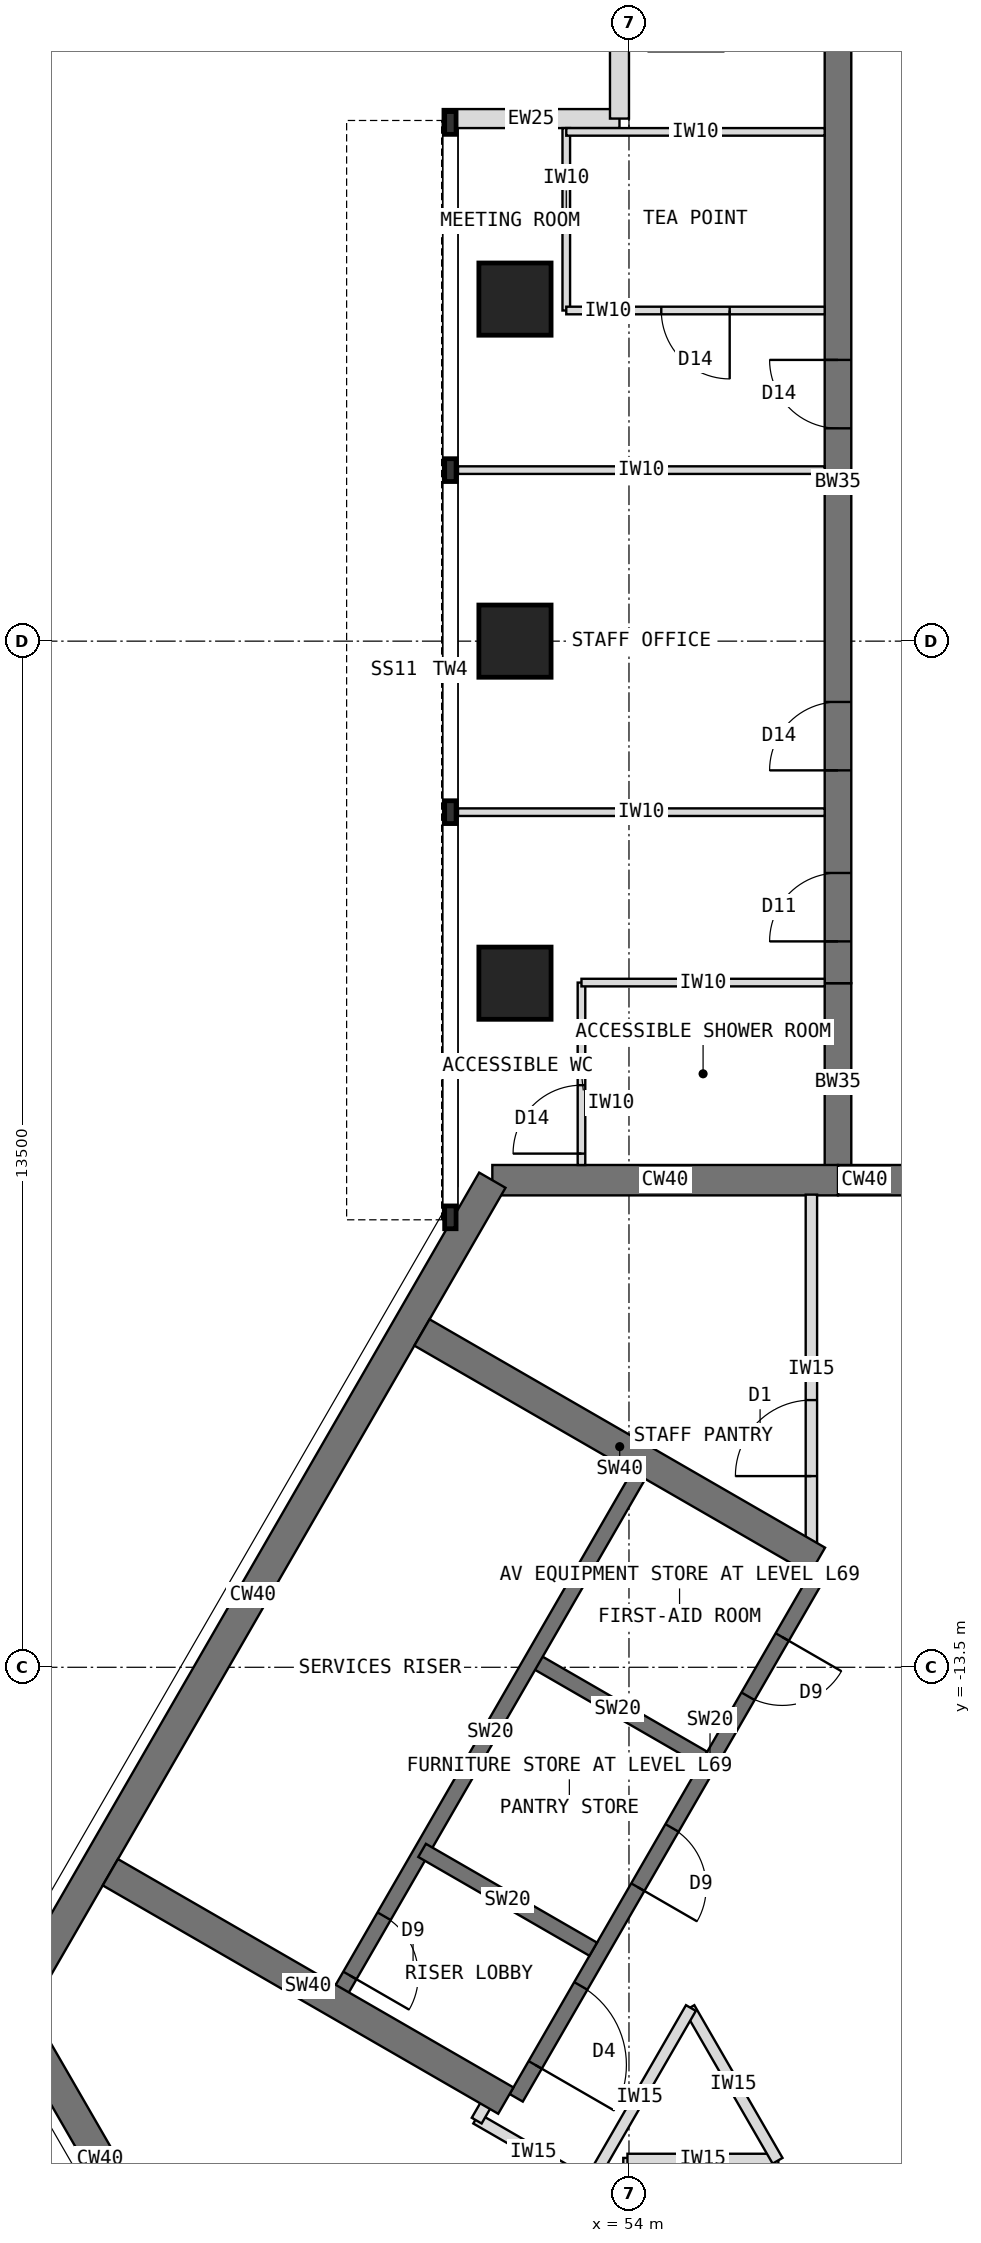
"""IFC4 building model, lengths in metres.
Left out: names, types, materials, properties, quantities, classifications, styles, units other than length and angle.
Written with IfcOpenShell. Run it as: python <this file> out.ifc"""

import sys

from ifc_helpers import new_model, si_unit, direction, frame, frame_2d, origin, origin_2d, place, context, subcontext, project, spatial, rectangle, extrude, element, fill, save


model = new_model("IFC4")
c1 = context("Model", 3, precision=1e-05, world=origin(), true_north=direction((0.0, 1.0)))
c2 = subcontext(c1, "Body", "Model", "MODEL_VIEW")
j1 = project(units=[si_unit("LENGTHUNIT", "METRE"), si_unit("PLANEANGLEUNIT", "RADIAN")], contexts=[c1])
p1 = place(None, origin())
s1 = spatial("IfcSite", under=j1, at=p1, CompositionType="ELEMENT")
p2 = place(p1, origin())
s2 = spatial("IfcBuilding", under=s1, at=p2, CompositionType="ELEMENT")
p3 = place(p2, frame((0.0, 0.0, 279.5)))
s3 = spatial("IfcBuildingStorey", under=s2, at=p3, CompositionType="ELEMENT", Elevation=279.5)
p4 = place(p3, frame((60.25, -7.092, 0.0), z_axis=(0.0, 0.0, 1.0), x_axis=(-1.0, 0.0, 0.0)))
e1 = element("IfcWall", 1, at=p4, inside=s3, PredefinedType="SHEAR", context=c2, shape_type="SweptSolid", body=[
    extrude(rectangle(XDim=3.5, YDim=0.4, at=frame_2d((1.75, 0.0))), origin(), (0.0, 0.0, 1.0), 4.0),
])
p5 = place(p4, frame((0.85, 0.0, 0.0)))
e2 = element("IfcOpeningElement", 2, at=p5, cuts=e1, PredefinedType="OPENING", context=c2, shape_type="SweptSolid", body=[
    extrude(rectangle(XDim=1.8, YDim=2.1, at=frame_2d((0.9, 1.05))), frame((0.0, 0.21, 0.0), z_axis=(0.0, -1.0, 0.0), x_axis=(1.0, 0.0, 0.0)), (0.0, 0.0, 1.0), 0.42),
])
p6 = place(p3, frame((56.75, -7.092, 0.0), z_axis=(0.0, 0.0, 1.0), x_axis=(-1.0, 0.0, 0.0)))
e3 = element("IfcWall", 3, at=p6, inside=s3, PredefinedType="SHEAR", context=c2, shape_type="SweptSolid", body=[
    extrude(rectangle(XDim=4.548, YDim=0.4, at=frame_2d((2.274, 0.0))), origin(), (0.0, 0.0, 1.0), 4.0),
])
p7 = place(p3, frame((52.202, -7.092, 0.0), z_axis=(0.0, 0.0, 1.0), x_axis=(-0.500005998175, -0.866021940709, 0.0)))
e4 = element("IfcWall", 4, at=p7, inside=s3, PredefinedType="SHEAR", context=c2, shape_type="SweptSolid", body=[
    extrude(rectangle(XDim=12.596, YDim=0.4, at=frame_2d((6.298, 0.0))), origin(), (0.0, 0.0, 1.0), 4.0),
])
p8 = place(p3, frame((45.904, -18.0, 0.0), z_axis=(0.0, 0.0, 1.0), x_axis=(0.500024481964, -0.866011268655, 0.0)))
e5 = element("IfcWall", 5, at=p8, inside=s3, PredefinedType="SHEAR", context=c2, shape_type="SweptSolid", body=[
    extrude(rectangle(XDim=4.548, YDim=0.4, at=frame_2d((2.274, 0.0))), origin(), (0.0, 0.0, 1.0), 4.0),
])
p9 = place(p3, frame((56.75, -7.092, 0.0), z_axis=(0.0, 0.0, 1.0), x_axis=(0.0, 1.0, 0.0)))
e6 = element("IfcWall", 6, at=p9, inside=s3, PredefinedType="SHEAR", context=c2, shape_type="SweptSolid", body=[
    extrude(rectangle(XDim=2.592, YDim=0.35, at=frame_2d((1.296, 0.0))), origin(), (0.0, 0.0, 1.0), 4.0),
])
p10 = place(p3, frame((56.75, -4.5, 0.0), z_axis=(0.0, 0.0, 1.0), x_axis=(0.0, 1.0, 0.0)))
e7 = element("IfcWall", 7, at=p10, inside=s3, PredefinedType="SHEAR", context=c2, shape_type="SweptSolid", body=[
    extrude(rectangle(XDim=13.2, YDim=0.35, at=frame_2d((6.6, 0.0))), origin(), (0.0, 0.0, 1.0), 4.0),
])
p11 = place(p10, frame((0.55, 0.0, 0.0)))
e8 = element("IfcOpeningElement", 8, at=p11, cuts=e7, PredefinedType="OPENING", context=c2, shape_type="SweptSolid", body=[
    extrude(rectangle(XDim=0.9, YDim=2.1, at=frame_2d((0.45, 1.05))), frame((0.0, 0.185, 0.0), z_axis=(0.0, -1.0, 0.0), x_axis=(1.0, 0.0, 0.0)), (0.0, 0.0, 1.0), 0.37),
])
p12 = place(p10, frame((2.8, 0.0, 0.0)))
e9 = element("IfcOpeningElement", 9, at=p12, cuts=e7, PredefinedType="OPENING", context=c2, shape_type="SweptSolid", body=[
    extrude(rectangle(XDim=0.9, YDim=2.1, at=frame_2d((0.45, 1.05))), frame((0.0, 0.185, 0.0), z_axis=(0.0, -1.0, 0.0), x_axis=(1.0, 0.0, 0.0)), (0.0, 0.0, 1.0), 0.37),
])
p13 = place(p10, frame((7.3, 0.0, 0.0)))
e10 = element("IfcOpeningElement", 10, at=p13, cuts=e7, PredefinedType="OPENING", context=c2, shape_type="SweptSolid", body=[
    extrude(rectangle(XDim=0.9, YDim=2.1, at=frame_2d((0.45, 1.05))), frame((0.0, 0.185, 0.0), z_axis=(0.0, -1.0, 0.0), x_axis=(1.0, 0.0, 0.0)), (0.0, 0.0, 1.0), 0.37),
])
for number, where, z_axis, x_axis in (
    (11, (52.5, -4.5, 0.0), (0.0, 0.0, 1.0), (1.0, 0.0, 0.0)),
    (12, (52.5, 0.0, 0.0), (0.0, 0.0, 1.0), (1.0, 0.0, 0.0)),
    (13, (52.5, 4.5, 0.0), (0.0, 0.0, 1.0), (1.0, 0.0, 0.0)),
):
    element("IfcColumn", number, at=place(p3, frame(where, z_axis=z_axis, x_axis=x_axis)), inside=s3, PredefinedType="COLUMN", context=c2, shape_type="SweptSolid", body=[
        extrude(rectangle(XDim=0.95, YDim=0.95, at=origin_2d()), origin(), (0.0, 0.0, 1.0), 4.0),
    ])
for number, where, z_axis, x_axis in (
    (14, (51.55, 6.875, 0.0), (0.0, 0.0, 1.0), (1.0, 0.0, 0.0)),
    (15, (53.875, 6.875, 0.0), (0.0, 0.0, 1.0), (0.0, 1.0, 0.0)),
):
    element("IfcWall", number, at=place(p3, frame(where, z_axis=z_axis, x_axis=x_axis)), inside=s3, PredefinedType="STANDARD", context=c2, shape_type="SweptSolid", body=[
        extrude(rectangle(XDim=2.325, YDim=0.25, at=frame_2d((1.163, 0.0))), origin(), (0.0, 0.0, 1.0), 3.8),
    ])
p14 = place(p3, frame((56.516, -12.236, 0.0), z_axis=(0.0, 0.0, 1.0), x_axis=(-0.49999894854, -0.866026010844, 0.0)))
e16 = element("IfcWall", 16, at=p14, inside=s3, PredefinedType="SHEAR", context=c2, shape_type="SweptSolid", body=[
    extrude(rectangle(XDim=8.0, YDim=0.2, at=frame_2d((4.0, 0.0))), origin(), (0.0, 0.0, 1.0), 4.0),
])
p15 = place(p14, frame((6.3, 0.0, 0.0)))
e17 = element("IfcOpeningElement", 17, at=p15, cuts=e16, PredefinedType="OPENING", context=c2, shape_type="SweptSolid", body=[
    extrude(rectangle(XDim=1.2, YDim=2.1, at=frame_2d((0.6, 1.05))), frame((0.0, 0.11, 0.0), z_axis=(0.0, -1.0, 0.0), x_axis=(1.0, 0.0, 0.0)), (0.0, 0.0, 1.0), 0.22),
])
p16 = place(p14, frame((1.0, 0.0, 0.0)))
e18 = element("IfcOpeningElement", 18, at=p16, cuts=e16, PredefinedType="OPENING", context=c2, shape_type="SweptSolid", body=[
    extrude(rectangle(XDim=0.9, YDim=2.1, at=frame_2d((0.45, 1.05))), frame((0.0, 0.11, 0.0), z_axis=(0.0, -1.0, 0.0), x_axis=(1.0, 0.0, 0.0)), (0.0, 0.0, 1.0), 0.22),
])
p17 = place(p14, frame((3.9, 0.0, 0.0)))
e19 = element("IfcOpeningElement", 19, at=p17, cuts=e16, PredefinedType="OPENING", context=c2, shape_type="SweptSolid", body=[
    extrude(rectangle(XDim=0.9, YDim=2.1, at=frame_2d((0.45, 1.05))), frame((0.0, 0.11, 0.0), z_axis=(0.0, -1.0, 0.0), x_axis=(1.0, 0.0, 0.0)), (0.0, 0.0, 1.0), 0.22),
])
for number, where, z_axis, x_axis in (
    (20, (54.98, -14.697, 0.0), (0.0, 0.0, 1.0), (-0.866, 0.5, 0.0)),
    (21, (53.53, -17.209, 0.0), (0.0, 0.0, 1.0), (-0.866, 0.5, 0.0)),
):
    element("IfcWall", number, at=place(p3, frame(where, z_axis=z_axis, x_axis=x_axis)), inside=s3, PredefinedType="SHEAR", context=c2, shape_type="SweptSolid", body=[
        extrude(rectangle(XDim=2.6, YDim=0.2, at=frame_2d((1.3, 0.0))), origin(), (0.0, 0.0, 1.0), 4.0),
    ])
p18 = place(p3, frame((54.178, -10.886, 0.0), z_axis=(0.0, 0.0, 1.0), x_axis=(-0.49999894854, -0.866026010844, 0.0)))
e22 = element("IfcWall", 22, at=p18, inside=s3, PredefinedType="SHEAR", context=c2, shape_type="SweptSolid", body=[
    extrude(rectangle(XDim=8.0, YDim=0.2, at=frame_2d((4.0, 0.0))), origin(), (0.0, 0.0, 1.0), 4.0),
])
p19 = place(p18, frame((6.8, 0.0, 0.0)))
e23 = element("IfcOpeningElement", 23, at=p19, cuts=e22, PredefinedType="OPENING", context=c2, shape_type="SweptSolid", body=[
    extrude(rectangle(XDim=0.9, YDim=2.1, at=frame_2d((0.45, 1.05))), frame((0.0, 0.11, 0.0), z_axis=(0.0, -1.0, 0.0), x_axis=(1.0, 0.0, 0.0)), (0.0, 0.0, 1.0), 0.22),
])
for number, where, z_axis, x_axis in (
    (24, (52.38, -19.201, 0.0), (0.0, 0.0, 1.0), (-0.866, 0.5, 0.0)),
    (25, (56.48, -12.099, 0.0), (0.0, 0.0, 1.0), (-0.866, 0.5, 0.0)),
):
    element("IfcWall", number, at=place(p3, frame(where, z_axis=z_axis, x_axis=x_axis)), inside=s3, PredefinedType="SHEAR", context=c2, shape_type="SweptSolid", body=[
        extrude(rectangle(XDim=6.008, YDim=0.4, at=frame_2d((3.004, 0.0))), origin(), (0.0, 0.0, 1.0), 4.0),
    ])
for number, where, z_axis, x_axis in (
    (26, (56.575, -2.25, 0.0), (0.0, 0.0, 1.0), (-1.0, 0.0, 0.0)),
    (27, (56.575, 2.25, 0.0), (0.0, 0.0, 1.0), (-1.0, 0.0, 0.0)),
):
    element("IfcWall", number, at=place(p3, frame(where, z_axis=z_axis, x_axis=x_axis)), inside=s3, PredefinedType="PARTITIONING", context=c2, shape_type="SweptSolid", body=[
        extrude(rectangle(XDim=4.825, YDim=0.1, at=frame_2d((2.413, 0.0))), origin(), (0.0, 0.0, 1.0), 3.8),
    ])
p20 = place(p3, frame((53.175, 4.35, 0.0), z_axis=(0.0, 0.0, 1.0), x_axis=(0.0, 1.0, 0.0)))
e28 = element("IfcWall", 28, at=p20, inside=s3, PredefinedType="PARTITIONING", context=c2, shape_type="SweptSolid", body=[
    extrude(rectangle(XDim=2.4, YDim=0.1, at=frame_2d((1.2, 0.0))), origin(), (0.0, 0.0, 1.0), 3.8),
])
p21 = place(p3, frame((56.575, 4.35, 0.0), z_axis=(0.0, 0.0, 1.0), x_axis=(-1.0, 0.0, 0.0)))
e29 = element("IfcWall", 29, at=p21, inside=s3, PredefinedType="PARTITIONING", context=c2, shape_type="SweptSolid", body=[
    extrude(rectangle(XDim=3.4, YDim=0.1, at=frame_2d((1.7, 0.0))), origin(), (0.0, 0.0, 1.0), 3.8),
])
p22 = place(p21, frame((1.25, 0.0, 0.0)))
e30 = element("IfcOpeningElement", 30, at=p22, cuts=e29, PredefinedType="OPENING", context=c2, shape_type="SweptSolid", body=[
    extrude(rectangle(XDim=0.9, YDim=2.1, at=frame_2d((0.45, 1.05))), frame((0.0, 0.06, 0.0), z_axis=(0.0, -1.0, 0.0), x_axis=(1.0, 0.0, 0.0)), (0.0, 0.0, 1.0), 0.12),
])
p23 = place(p3, frame((56.575, 6.7, 0.0), z_axis=(0.0, 0.0, 1.0), x_axis=(-1.0, 0.0, 0.0)))
e31 = element("IfcWall", 31, at=p23, inside=s3, PredefinedType="PARTITIONING", context=c2, shape_type="SweptSolid", body=[
    extrude(rectangle(XDim=3.4, YDim=0.1, at=frame_2d((1.7, 0.0))), origin(), (0.0, 0.0, 1.0), 3.8),
])
p24 = place(p3, frame((53.375, -6.892, 0.0), z_axis=(0.0, 0.0, 1.0), x_axis=(0.0, 1.0, 0.0)))
e32 = element("IfcWall", 32, at=p24, inside=s3, PredefinedType="PARTITIONING", context=c2, shape_type="SweptSolid", body=[
    extrude(rectangle(XDim=2.4, YDim=0.1, at=frame_2d((1.2, 0.0))), origin(), (0.0, 0.0, 1.0), 3.8),
])
p25 = place(p24, frame((0.15, 0.0, 0.0)))
e33 = element("IfcOpeningElement", 33, at=p25, cuts=e32, PredefinedType="OPENING", context=c2, shape_type="SweptSolid", body=[
    extrude(rectangle(XDim=0.9, YDim=2.1, at=frame_2d((0.45, 1.05))), frame((0.0, 0.06, 0.0), z_axis=(0.0, -1.0, 0.0), x_axis=(1.0, 0.0, 0.0)), (0.0, 0.0, 1.0), 0.12),
])
p26 = place(p3, frame((56.575, -4.492, 0.0), z_axis=(0.0, 0.0, 1.0), x_axis=(-1.0, 0.0, 0.0)))
e34 = element("IfcWall", 34, at=p26, inside=s3, PredefinedType="PARTITIONING", context=c2, shape_type="SweptSolid", body=[
    extrude(rectangle(XDim=3.2, YDim=0.1, at=frame_2d((1.6, 0.0))), origin(), (0.0, 0.0, 1.0), 3.267),
])
p27 = place(p3, frame((54.0, -22.92, 0.0), z_axis=(0.0, 0.0, 1.0), x_axis=(0.0, 1.0, 0.0)))
e35 = element("IfcWall", 35, at=p27, inside=s3, PredefinedType="PARTITIONING", context=c2, shape_type="SweptSolid", body=[
    extrude(rectangle(XDim=2.965, YDim=0.15, at=frame_2d((1.482, 0.0))), origin(), (0.0, 0.0, 1.0), 3.8),
])
p28 = place(p27, frame((0.8, 0.0, 0.0)))
e36 = element("IfcOpeningElement", 36, at=p28, cuts=e35, PredefinedType="OPENING", context=c2, shape_type="SweptSolid", body=[
    extrude(rectangle(XDim=1.0, YDim=2.1, at=frame_2d((0.5, 1.05))), frame((0.0, 0.085, 0.0), z_axis=(0.0, -1.0, 0.0), x_axis=(1.0, 0.0, 0.0)), (0.0, 0.0, 1.0), 0.17),
])
p29 = place(p3, frame((53.98, -19.975, 0.0), z_axis=(0.0, 0.0, 1.0), x_axis=(1.0, 0.0, 0.0)))
e37 = element("IfcWall", 37, at=p29, inside=s3, PredefinedType="PARTITIONING", context=c2, shape_type="SweptSolid", body=[
    extrude(rectangle(XDim=1.985, YDim=0.15, at=frame_2d((0.993, 0.0))), origin(), (0.0, 0.0, 1.0), 3.8),
])
p30 = place(p3, frame((55.955, -19.992, 0.0), z_axis=(0.0, 0.0, 1.0), x_axis=(-0.499941024108, 0.866059450854, 0.0)))
e38 = element("IfcWall", 38, at=p30, inside=s3, PredefinedType="PARTITIONING", context=c2, shape_type="SweptSolid", body=[
    extrude(rectangle(XDim=2.321, YDim=0.15, at=frame_2d((1.16, 0.0))), origin(), (0.0, 0.0, 1.0), 3.8),
])
p31 = place(p3, frame((54.815, -17.983, 0.0), z_axis=(0.0, 0.0, 1.0), x_axis=(-0.499981473571, -0.866036099759, 0.0)))
e39 = element("IfcWall", 39, at=p31, inside=s3, PredefinedType="PARTITIONING", context=c2, shape_type="SweptSolid", body=[
    extrude(rectangle(XDim=2.692, YDim=0.15, at=frame_2d((1.346, 0.0))), origin(), (0.0, 0.0, 1.0), 3.8),
])
p32 = place(p3, frame((53.496, -20.307, 0.0), z_axis=(0.0, 0.0, 1.0), x_axis=(-0.865989304205, 0.500062521093, 0.0)))
e40 = element("IfcWall", 40, at=p32, inside=s3, PredefinedType="PARTITIONING", context=c2, shape_type="SweptSolid", body=[
    extrude(rectangle(XDim=1.74, YDim=0.15, at=frame_2d((0.87, 0.0))), origin(), (0.0, 0.0, 1.0), 3.8),
])
p33 = place(p3, frame((51.997, -19.464, 0.0), z_axis=(0.0, 0.0, 1.0), x_axis=(0.499804398801, 0.866138304741, 0.0)))
e41 = element("IfcWall", 41, at=p33, inside=s3, PredefinedType="PARTITIONING", context=c2, shape_type="SweptSolid", body=[
    extrude(rectangle(XDim=0.43, YDim=0.15, at=frame_2d((0.215, 0.0))), origin(), (0.0, 0.0, 1.0), 3.8),
])
p34 = place(p3, frame((56.4, -11.857, 0.0), z_axis=(0.0, 0.0, 1.0), x_axis=(0.0, 1.0, 0.0)))
e42 = element("IfcWall", 42, at=p34, inside=s3, PredefinedType="PARTITIONING", context=c2, shape_type="SweptSolid", body=[
    extrude(rectangle(XDim=4.576, YDim=0.15, at=frame_2d((2.288, 0.0))), origin(), (0.0, 0.0, 1.0), 3.8),
])
p35 = place(p34, frame((0.873, 0.0, 0.0)))
e43 = element("IfcOpeningElement", 43, at=p35, cuts=e42, PredefinedType="OPENING", context=c2, shape_type="SweptSolid", body=[
    extrude(rectangle(XDim=1.0, YDim=2.1, at=frame_2d((0.5, 1.05))), frame((0.0, 0.085, 0.0), z_axis=(0.0, -1.0, 0.0), x_axis=(1.0, 0.0, 0.0)), (0.0, 0.0, 1.0), 0.17),
])
p36 = place(p15, origin())
e44 = element("IfcDoor", 44, at=p36, inside=s3, OperationType="SINGLE_SWING_RIGHT", PredefinedType="DOOR", context=c2, shape_type="SweptSolid", body=[
    extrude(rectangle(XDim=1.2, YDim=2.1, at=frame_2d((0.6, 1.05))), frame((0.0, 0.025, 0.0), z_axis=(0.0, -1.0, 0.0), x_axis=(1.0, 0.0, 0.0)), (0.0, 0.0, 1.0), 0.05),
])
fill(e17, e44)
p37 = place(p19, origin())
e45 = element("IfcDoor", 45, at=p37, inside=s3, OperationType="SINGLE_SWING_RIGHT", PredefinedType="DOOR", context=c2, shape_type="SweptSolid", body=[
    extrude(rectangle(XDim=0.9, YDim=2.1, at=frame_2d((0.45, 1.05))), frame((0.0, 0.025, 0.0), z_axis=(0.0, -1.0, 0.0), x_axis=(1.0, 0.0, 0.0)), (0.0, 0.0, 1.0), 0.05),
])
fill(e23, e45)
p38 = place(p22, origin())
e46 = element("IfcDoor", 46, at=p38, inside=s3, OperationType="SINGLE_SWING_LEFT", PredefinedType="DOOR", context=c2, shape_type="SweptSolid", body=[
    extrude(rectangle(XDim=0.9, YDim=2.1, at=frame_2d((0.45, 1.05))), frame((0.0, 0.025, 0.0), z_axis=(0.0, -1.0, 0.0), x_axis=(1.0, 0.0, 0.0)), (0.0, 0.0, 1.0), 0.05),
])
fill(e30, e46)
p39 = place(p25, origin())
e47 = element("IfcDoor", 47, at=p39, inside=s3, OperationType="SINGLE_SWING_LEFT", PredefinedType="DOOR", context=c2, shape_type="SweptSolid", body=[
    extrude(rectangle(XDim=0.9, YDim=2.1, at=frame_2d((0.45, 1.05))), frame((0.0, 0.025, 0.0), z_axis=(0.0, -1.0, 0.0), x_axis=(1.0, 0.0, 0.0)), (0.0, 0.0, 1.0), 0.05),
])
fill(e33, e47)
p40 = place(p35, origin())
e48 = element("IfcDoor", 48, at=p40, inside=s3, OperationType="SINGLE_SWING_LEFT", PredefinedType="DOOR", context=c2, shape_type="SweptSolid", body=[
    extrude(rectangle(XDim=1.0, YDim=2.1, at=frame_2d((0.5, 1.05))), frame((0.0, 0.025, 0.0), z_axis=(0.0, -1.0, 0.0), x_axis=(1.0, 0.0, 0.0)), (0.0, 0.0, 1.0), 0.05),
])
fill(e43, e48)
p41 = place(p11, origin())
e49 = element("IfcDoor", 49, at=p41, inside=s3, OperationType="SINGLE_SWING_LEFT", PredefinedType="DOOR", context=c2, shape_type="SweptSolid", body=[
    extrude(rectangle(XDim=0.9, YDim=2.1, at=frame_2d((0.45, 1.05))), frame((0.0, 0.025, 0.0), z_axis=(0.0, -1.0, 0.0), x_axis=(1.0, 0.0, 0.0)), (0.0, 0.0, 1.0), 0.05),
])
fill(e8, e49)
p42 = place(p12, origin())
e50 = element("IfcDoor", 50, at=p42, inside=s3, OperationType="SINGLE_SWING_LEFT", PredefinedType="DOOR", context=c2, shape_type="SweptSolid", body=[
    extrude(rectangle(XDim=0.9, YDim=2.1, at=frame_2d((0.45, 1.05))), frame((0.0, 0.025, 0.0), z_axis=(0.0, -1.0, 0.0), x_axis=(1.0, 0.0, 0.0)), (0.0, 0.0, 1.0), 0.05),
])
fill(e9, e50)
p43 = place(p13, origin())
e51 = element("IfcDoor", 51, at=p43, inside=s3, OperationType="SINGLE_SWING_RIGHT", PredefinedType="DOOR", context=c2, shape_type="SweptSolid", body=[
    extrude(rectangle(XDim=0.9, YDim=2.1, at=frame_2d((0.45, 1.05))), frame((0.0, 0.025, 0.0), z_axis=(0.0, -1.0, 0.0), x_axis=(1.0, 0.0, 0.0)), (0.0, 0.0, 1.0), 0.05),
])
fill(e10, e51)
p44 = place(p16, origin())
e52 = element("IfcDoor", 52, at=p44, inside=s3, OperationType="SINGLE_SWING_LEFT", PredefinedType="DOOR", context=c2, shape_type="SweptSolid", body=[
    extrude(rectangle(XDim=0.9, YDim=2.1, at=frame_2d((0.45, 1.05))), frame((0.0, 0.025, 0.0), z_axis=(0.0, -1.0, 0.0), x_axis=(1.0, 0.0, 0.0)), (0.0, 0.0, 1.0), 0.05),
])
fill(e18, e52)
p45 = place(p17, origin())
e53 = element("IfcDoor", 53, at=p45, inside=s3, OperationType="SINGLE_SWING_RIGHT", PredefinedType="DOOR", context=c2, shape_type="SweptSolid", body=[
    extrude(rectangle(XDim=0.9, YDim=2.1, at=frame_2d((0.45, 1.05))), frame((0.0, 0.025, 0.0), z_axis=(0.0, -1.0, 0.0), x_axis=(1.0, 0.0, 0.0)), (0.0, 0.0, 1.0), 0.05),
])
fill(e19, e53)
save(model, sys.argv[1])
